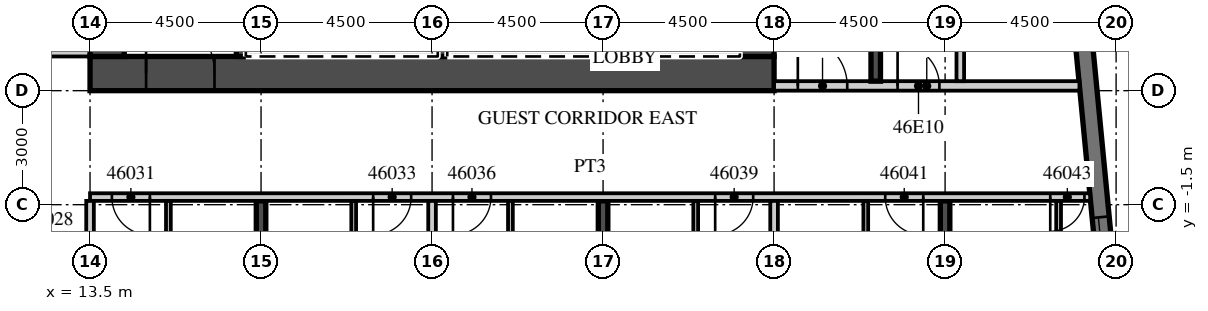
"""IFC4 building model, lengths in metres.
Left out: names, types, materials, properties, quantities, classifications, styles, units other than length and angle.
Written with IfcOpenShell. Run it as: python <this file> out.ifc"""

import sys

from ifc_helpers import new_model, si_unit, direction, frame, frame_2d, origin, place, context, subcontext, project, spatial, rectangle, extrude, element, fill, save


model = new_model("IFC4")
c1 = context("Model", 3, precision=1e-05, world=origin(), true_north=direction((0.0, 1.0)))
c2 = subcontext(c1, "Body", "Model", "MODEL_VIEW")
j1 = project(units=[si_unit("LENGTHUNIT", "METRE"), si_unit("PLANEANGLEUNIT", "RADIAN")], contexts=[c1])
p1 = place(None, origin())
s1 = spatial("IfcSite", under=j1, at=p1, CompositionType="ELEMENT")
p2 = place(p1, origin())
s2 = spatial("IfcBuilding", under=s1, at=p2, CompositionType="ELEMENT")
p3 = place(p2, frame((0.0, 0.0, 193.3)))
s3 = spatial("IfcBuildingStorey", under=s2, at=p3, CompositionType="ELEMENT", Elevation=193.3)
p4 = place(p3, frame((18.0, -19.245, 0.0), z_axis=(0.0, 0.0, 1.0), x_axis=(0.0, 1.0, 0.0)))
e1 = element("IfcWall", 1, at=p4, inside=s3, PredefinedType="SHEAR", context=c2, shape_type="SweptSolid", body=[
    extrude(rectangle(XDim=17.845, YDim=0.25, at=frame_2d((8.923, 0.0))), origin(), (0.0, 0.0, 1.0), 3.3),
])
p5 = place(p3, frame((27.0, -18.379, 0.0), z_axis=(0.0, 0.0, 1.0), x_axis=(0.0, 1.0, 0.0)))
e2 = element("IfcWall", 2, at=p5, inside=s3, PredefinedType="SHEAR", context=c2, shape_type="SweptSolid", body=[
    extrude(rectangle(XDim=16.979, YDim=0.25, at=frame_2d((8.489, 0.0))), origin(), (0.0, 0.0, 1.0), 3.3),
])
p6 = place(p3, frame((36.0, -17.512, 0.0), z_axis=(0.0, 0.0, 1.0), x_axis=(0.0, 1.0, 0.0)))
e3 = element("IfcWall", 3, at=p6, inside=s3, PredefinedType="SHEAR", context=c2, shape_type="SweptSolid", body=[
    extrude(rectangle(XDim=16.112, YDim=0.25, at=frame_2d((8.056, 0.0))), origin(), (0.0, 0.0, 1.0), 3.3),
])
p7 = place(p3, frame((41.214, -13.466, 0.0), z_axis=(0.0, 0.0, 1.0), x_axis=(-0.095847314626, 0.995396047952, 0.0)))
e4 = element("IfcWall", 4, at=p7, inside=s3, PredefinedType="SOLIDWALL", context=c2, shape_type="SweptSolid", body=[
    extrude(rectangle(XDim=34.0, YDim=0.45, at=frame_2d((17.0, 0.0))), origin(), (0.0, 0.0, 1.0), 3.02),
])
p8 = place(p7, frame((3.869, 0.0, 0.45)))
e5 = element("IfcOpeningElement", 5, at=p8, cuts=e4, PredefinedType="OPENING", context=c2, shape_type="SweptSolid", body=[
    extrude(rectangle(XDim=3.3, YDim=2.25, at=frame_2d((1.65, 1.125))), frame((0.0, 0.235, 0.0), z_axis=(0.0, -1.0, 0.0), x_axis=(1.0, 0.0, 0.0)), (0.0, 0.0, 1.0), 0.47),
])
p9 = place(p7, frame((8.39, 0.0, 0.45)))
e6 = element("IfcOpeningElement", 6, at=p9, cuts=e4, PredefinedType="OPENING", context=c2, shape_type="SweptSolid", body=[
    extrude(rectangle(XDim=3.3, YDim=2.25, at=frame_2d((1.65, 1.125))), frame((0.0, 0.235, 0.0), z_axis=(0.0, -1.0, 0.0), x_axis=(1.0, 0.0, 0.0)), (0.0, 0.0, 1.0), 0.47),
])
p10 = place(p3, frame((-13.5, 2.5, 0.0), z_axis=(0.0, 0.0, 1.0), x_axis=(1.0, 0.0, 0.0)))
e7 = element("IfcWall", 7, at=p10, inside=s3, PredefinedType="PARTITIONING", context=c2, shape_type="SweptSolid", body=[
    extrude(rectangle(XDim=27.0, YDim=0.2, at=frame_2d((13.5, 0.0))), origin(), (0.0, 0.0, 1.0), 3.02),
])
p11 = place(p10, frame((0.575, 0.0, 0.0)))
e8 = element("IfcOpeningElement", 8, at=p11, cuts=e7, PredefinedType="OPENING", context=c2, shape_type="SweptSolid", body=[
    extrude(rectangle(XDim=1.0, YDim=2.1, at=frame_2d((0.5, 1.05))), frame((0.0, 0.11, 0.0), z_axis=(0.0, -1.0, 0.0), x_axis=(1.0, 0.0, 0.0)), (0.0, 0.0, 1.0), 0.22),
])
p12 = place(p10, frame((9.863, 0.0, 0.0)))
e9 = element("IfcOpeningElement", 9, at=p12, cuts=e7, PredefinedType="OPENING", context=c2, shape_type="SweptSolid", body=[
    extrude(rectangle(XDim=1.2, YDim=2.1, at=frame_2d((0.6, 1.05))), frame((0.0, 0.11, 0.0), z_axis=(0.0, -1.0, 0.0), x_axis=(1.0, 0.0, 0.0)), (0.0, 0.0, 1.0), 0.22),
])
p13 = place(p10, frame((14.075, 0.0, 0.0)))
e10 = element("IfcOpeningElement", 10, at=p13, cuts=e7, PredefinedType="OPENING", context=c2, shape_type="SweptSolid", body=[
    extrude(rectangle(XDim=1.0, YDim=2.1, at=frame_2d((0.5, 1.05))), frame((0.0, 0.11, 0.0), z_axis=(0.0, -1.0, 0.0), x_axis=(1.0, 0.0, 0.0)), (0.0, 0.0, 1.0), 0.22),
])
p14 = place(p10, frame((18.55, 0.0, 0.0)))
e11 = element("IfcOpeningElement", 11, at=p14, cuts=e7, PredefinedType="OPENING", context=c2, shape_type="SweptSolid", body=[
    extrude(rectangle(XDim=1.0, YDim=2.1, at=frame_2d((0.5, 1.05))), frame((0.0, 0.11, 0.0), z_axis=(0.0, -1.0, 0.0), x_axis=(1.0, 0.0, 0.0)), (0.0, 0.0, 1.0), 0.22),
])
p15 = place(p10, frame((23.075, 0.0, 0.0)))
e12 = element("IfcOpeningElement", 12, at=p15, cuts=e7, PredefinedType="OPENING", context=c2, shape_type="SweptSolid", body=[
    extrude(rectangle(XDim=1.0, YDim=2.1, at=frame_2d((0.5, 1.05))), frame((0.0, 0.11, 0.0), z_axis=(0.0, -1.0, 0.0), x_axis=(1.0, 0.0, 0.0)), (0.0, 0.0, 1.0), 0.22),
])
p16 = place(p3, frame((13.5, -1.3, 0.0), z_axis=(0.0, 0.0, 1.0), x_axis=(1.0, 0.0, 0.0)))
e13 = element("IfcWall", 13, at=p16, inside=s3, PredefinedType="PARTITIONING", context=c2, shape_type="SweptSolid", body=[
    extrude(rectangle(XDim=26.317, YDim=0.2, at=frame_2d((13.158, 0.0))), origin(), (0.0, 0.0, 1.0), 3.02),
])
p17 = place(p16, frame((0.575, 0.0, 0.0)))
e14 = element("IfcOpeningElement", 14, at=p17, cuts=e13, PredefinedType="OPENING", context=c2, shape_type="SweptSolid", body=[
    extrude(rectangle(XDim=1.0, YDim=2.1, at=frame_2d((0.5, 1.05))), frame((0.0, 0.11, 0.0), z_axis=(0.0, -1.0, 0.0), x_axis=(1.0, 0.0, 0.0)), (0.0, 0.0, 1.0), 0.22),
])
p18 = place(p16, frame((7.45, 0.0, 0.0)))
e15 = element("IfcOpeningElement", 15, at=p18, cuts=e13, PredefinedType="OPENING", context=c2, shape_type="SweptSolid", body=[
    extrude(rectangle(XDim=1.0, YDim=2.1, at=frame_2d((0.5, 1.05))), frame((0.0, 0.11, 0.0), z_axis=(0.0, -1.0, 0.0), x_axis=(1.0, 0.0, 0.0)), (0.0, 0.0, 1.0), 0.22),
])
p19 = place(p16, frame((9.55, 0.0, 0.0)))
e16 = element("IfcOpeningElement", 16, at=p19, cuts=e13, PredefinedType="OPENING", context=c2, shape_type="SweptSolid", body=[
    extrude(rectangle(XDim=1.0, YDim=2.1, at=frame_2d((0.5, 1.05))), frame((0.0, 0.11, 0.0), z_axis=(0.0, -1.0, 0.0), x_axis=(1.0, 0.0, 0.0)), (0.0, 0.0, 1.0), 0.22),
])
p20 = place(p16, frame((16.45, 0.0, 0.0)))
e17 = element("IfcOpeningElement", 17, at=p20, cuts=e13, PredefinedType="OPENING", context=c2, shape_type="SweptSolid", body=[
    extrude(rectangle(XDim=1.0, YDim=2.1, at=frame_2d((0.5, 1.05))), frame((0.0, 0.11, 0.0), z_axis=(0.0, -1.0, 0.0), x_axis=(1.0, 0.0, 0.0)), (0.0, 0.0, 1.0), 0.22),
])
p21 = place(p16, frame((20.925, 0.0, 0.0)))
e18 = element("IfcOpeningElement", 18, at=p21, cuts=e13, PredefinedType="OPENING", context=c2, shape_type="SweptSolid", body=[
    extrude(rectangle(XDim=1.0, YDim=2.1, at=frame_2d((0.5, 1.05))), frame((0.0, 0.11, 0.0), z_axis=(0.0, -1.0, 0.0), x_axis=(1.0, 0.0, 0.0)), (0.0, 0.0, 1.0), 0.22),
])
p22 = place(p16, frame((25.267, 0.0, 0.0)))
e19 = element("IfcOpeningElement", 19, at=p22, cuts=e13, PredefinedType="OPENING", context=c2, shape_type="SweptSolid", body=[
    extrude(rectangle(XDim=0.9, YDim=2.1, at=frame_2d((0.45, 1.05))), frame((0.0, 0.11, 0.0), z_axis=(0.0, -1.0, 0.0), x_axis=(1.0, 0.0, 0.0)), (0.0, 0.0, 1.0), 0.22),
])
p23 = place(p3, frame((13.5, -19.701, 0.0), z_axis=(0.0, 0.0, 1.0), x_axis=(0.0, 1.0, 0.0)))
e20 = element("IfcWall", 20, at=p23, inside=s3, PredefinedType="PARTITIONING", context=c2, shape_type="SweptSolid", body=[
    extrude(rectangle(XDim=18.301, YDim=0.2, at=frame_2d((9.15, 0.0))), origin(), (0.0, 0.0, 1.0), 3.02),
])
p24 = place(p3, frame((15.562, -8.625, 0.0), z_axis=(0.0, 0.0, 1.0), x_axis=(0.0, 1.0, 0.0)))
e21 = element("IfcWall", 21, at=p24, inside=s3, PredefinedType="PARTITIONING", context=c2, shape_type="SweptSolid", body=[
    extrude(rectangle(XDim=7.225, YDim=0.125, at=frame_2d((3.613, 0.0))), origin(), (0.0, 0.0, 1.0), 3.02),
])
p25 = place(p24, frame((3.875, 0.0, 0.0)))
e22 = element("IfcOpeningElement", 22, at=p25, cuts=e21, PredefinedType="OPENING", context=c2, shape_type="SweptSolid", body=[
    extrude(rectangle(XDim=0.9, YDim=2.1, at=frame_2d((0.45, 1.05))), frame((0.0, 0.073, 0.0), z_axis=(0.0, -1.0, 0.0), x_axis=(1.0, 0.0, 0.0)), (0.0, 0.0, 1.0), 0.145),
])
p26 = place(p3, frame((22.5, -18.834, 0.0), z_axis=(0.0, 0.0, 1.0), x_axis=(0.0, 1.0, 0.0)))
e23 = element("IfcWall", 23, at=p26, inside=s3, PredefinedType="PARTITIONING", context=c2, shape_type="SweptSolid", body=[
    extrude(rectangle(XDim=17.434, YDim=0.2, at=frame_2d((8.717, 0.0))), origin(), (0.0, 0.0, 1.0), 3.02),
])
p27 = place(p3, frame((20.438, -8.625, 0.0), z_axis=(0.0, 0.0, 1.0), x_axis=(0.0, 1.0, 0.0)))
e24 = element("IfcWall", 24, at=p27, inside=s3, PredefinedType="PARTITIONING", context=c2, shape_type="SweptSolid", body=[
    extrude(rectangle(XDim=7.225, YDim=0.125, at=frame_2d((3.613, 0.0))), origin(), (0.0, 0.0, 1.0), 3.02),
])
p28 = place(p27, frame((3.875, 0.0, 0.0)))
e25 = element("IfcOpeningElement", 25, at=p28, cuts=e24, PredefinedType="OPENING", context=c2, shape_type="SweptSolid", body=[
    extrude(rectangle(XDim=0.9, YDim=2.1, at=frame_2d((0.45, 1.05))), frame((0.0, 0.073, 0.0), z_axis=(0.0, -1.0, 0.0), x_axis=(1.0, 0.0, 0.0)), (0.0, 0.0, 1.0), 0.145),
])
p29 = place(p3, frame((24.562, -8.625, 0.0), z_axis=(0.0, 0.0, 1.0), x_axis=(0.0, 1.0, 0.0)))
e26 = element("IfcWall", 26, at=p29, inside=s3, PredefinedType="PARTITIONING", context=c2, shape_type="SweptSolid", body=[
    extrude(rectangle(XDim=7.225, YDim=0.125, at=frame_2d((3.613, 0.0))), origin(), (0.0, 0.0, 1.0), 3.02),
])
p30 = place(p29, frame((3.875, 0.0, 0.0)))
e27 = element("IfcOpeningElement", 27, at=p30, cuts=e26, PredefinedType="OPENING", context=c2, shape_type="SweptSolid", body=[
    extrude(rectangle(XDim=0.9, YDim=2.1, at=frame_2d((0.45, 1.05))), frame((0.0, 0.073, 0.0), z_axis=(0.0, -1.0, 0.0), x_axis=(1.0, 0.0, 0.0)), (0.0, 0.0, 1.0), 0.145),
])
p31 = place(p3, frame((31.5, -17.967, 0.0), z_axis=(0.0, 0.0, 1.0), x_axis=(0.0, 1.0, 0.0)))
e28 = element("IfcWall", 28, at=p31, inside=s3, PredefinedType="PARTITIONING", context=c2, shape_type="SweptSolid", body=[
    extrude(rectangle(XDim=16.567, YDim=0.2, at=frame_2d((8.284, 0.0))), origin(), (0.0, 0.0, 1.0), 3.02),
])
p32 = place(p3, frame((29.438, -8.625, 0.0), z_axis=(0.0, 0.0, 1.0), x_axis=(0.0, 1.0, 0.0)))
e29 = element("IfcWall", 29, at=p32, inside=s3, PredefinedType="PARTITIONING", context=c2, shape_type="SweptSolid", body=[
    extrude(rectangle(XDim=7.225, YDim=0.125, at=frame_2d((3.613, 0.0))), origin(), (0.0, 0.0, 1.0), 3.02),
])
p33 = place(p32, frame((3.875, 0.0, 0.0)))
e30 = element("IfcOpeningElement", 30, at=p33, cuts=e29, PredefinedType="OPENING", context=c2, shape_type="SweptSolid", body=[
    extrude(rectangle(XDim=0.9, YDim=2.1, at=frame_2d((0.45, 1.05))), frame((0.0, 0.073, 0.0), z_axis=(0.0, -1.0, 0.0), x_axis=(1.0, 0.0, 0.0)), (0.0, 0.0, 1.0), 0.145),
])
p34 = place(p3, frame((33.913, -8.625, 0.0), z_axis=(0.0, 0.0, 1.0), x_axis=(0.0, 1.0, 0.0)))
e31 = element("IfcWall", 31, at=p34, inside=s3, PredefinedType="PARTITIONING", context=c2, shape_type="SweptSolid", body=[
    extrude(rectangle(XDim=7.225, YDim=0.125, at=frame_2d((3.613, 0.0))), origin(), (0.0, 0.0, 1.0), 3.02),
])
p35 = place(p34, frame((3.875, 0.0, 0.0)))
e32 = element("IfcOpeningElement", 32, at=p35, cuts=e31, PredefinedType="OPENING", context=c2, shape_type="SweptSolid", body=[
    extrude(rectangle(XDim=0.9, YDim=2.1, at=frame_2d((0.45, 1.05))), frame((0.0, 0.073, 0.0), z_axis=(0.0, -1.0, 0.0), x_axis=(1.0, 0.0, 0.0)), (0.0, 0.0, 1.0), 0.145),
])
p36 = place(p3, frame((38.987, -6.445, 0.0), z_axis=(0.0, 0.0, 1.0), x_axis=(0.0, 1.0, 0.0)))
e33 = element("IfcWall", 33, at=p36, inside=s3, PredefinedType="PARTITIONING", context=c2, shape_type="SweptSolid", body=[
    extrude(rectangle(XDim=5.045, YDim=0.125, at=frame_2d((2.522, 0.0))), origin(), (0.0, 0.0, 1.0), 3.02),
])
p37 = place(p36, frame((1.695, 0.0, 0.0)))
e34 = element("IfcOpeningElement", 34, at=p37, cuts=e33, PredefinedType="OPENING", context=c2, shape_type="SweptSolid", body=[
    extrude(rectangle(XDim=0.9, YDim=2.1, at=frame_2d((0.45, 1.05))), frame((0.0, 0.073, 0.0), z_axis=(0.0, -1.0, 0.0), x_axis=(1.0, 0.0, 0.0)), (0.0, 0.0, 1.0), 0.145),
])
p38 = place(p3, frame((13.5, 1.95, 0.0), z_axis=(0.0, 0.0, 1.0), x_axis=(1.0, 0.0, 0.0)))
e35 = element("IfcWall", 35, at=p38, inside=s3, PredefinedType="SHEAR", context=c2, shape_type="SweptSolid", body=[
    extrude(rectangle(XDim=18.0, YDim=0.9, at=frame_2d((9.0, 0.0))), origin(), (0.0, 0.0, 1.0), 3.02),
])
p39 = place(p38, frame((1.475, 0.0, 0.0)))
e36 = element("IfcOpeningElement", 36, at=p39, cuts=e35, PredefinedType="OPENING", context=c2, shape_type="SweptSolid", body=[
    extrude(rectangle(XDim=1.8, YDim=2.1, at=frame_2d((0.9, 1.05))), frame((0.0, 0.46, 0.0), z_axis=(0.0, -1.0, 0.0), x_axis=(1.0, 0.0, 0.0)), (0.0, 0.0, 1.0), 0.92),
])
p40 = place(p3, frame((31.05, 2.4, 0.0), z_axis=(0.0, 0.0, 1.0), x_axis=(0.0, 1.0, 0.0)))
e37 = element("IfcWall", 37, at=p40, inside=s3, PredefinedType="SHEAR", context=c2, shape_type="SweptSolid", body=[
    extrude(rectangle(XDim=12.8, YDim=0.9, at=frame_2d((6.4, 0.0))), origin(), (0.0, 0.0, 1.0), 3.02),
])
p41 = place(p40, frame((0.2, 0.0, 0.0)))
e38 = element("IfcOpeningElement", 38, at=p41, cuts=e37, PredefinedType="OPENING", context=c2, shape_type="SweptSolid", body=[
    extrude(rectangle(XDim=1.1, YDim=2.1, at=frame_2d((0.55, 1.05))), frame((0.0, 0.46, 0.0), z_axis=(0.0, -1.0, 0.0), x_axis=(1.0, 0.0, 0.0)), (0.0, 0.0, 1.0), 0.92),
])
p42 = place(p3, frame((13.95, 2.4, 0.0), z_axis=(0.0, 0.0, 1.0), x_axis=(0.0, 1.0, 0.0)))
e39 = element("IfcWall", 39, at=p42, inside=s3, PredefinedType="SHEAR", context=c2, shape_type="SweptSolid", body=[
    extrude(rectangle(XDim=12.2, YDim=0.9, at=frame_2d((6.1, 0.0))), origin(), (0.0, 0.0, 1.0), 3.02),
])
p43 = place(p3, frame((17.475, 2.4, 0.0), z_axis=(0.0, 0.0, 1.0), x_axis=(0.0, 1.0, 0.0)))
e40 = element("IfcWall", 40, at=p43, inside=s3, PredefinedType="SHEAR", context=c2, shape_type="SweptSolid", body=[
    extrude(rectangle(XDim=3.15, YDim=0.25, at=frame_2d((1.575, 0.0))), origin(), (0.0, 0.0, 1.0), 3.02),
])
for number, where, z_axis, x_axis in (
    (41, (27.975, 2.4, 0.0), (0.0, 0.0, 1.0), (0.0, 1.0, 0.0)),
    (42, (22.775, 2.4, 0.0), (0.0, 0.0, 1.0), (0.0, 1.0, 0.0)),
):
    element("IfcWall", number, at=place(p3, frame(where, z_axis=z_axis, x_axis=x_axis)), inside=s3, PredefinedType="SHEAR", context=c2, shape_type="SweptSolid", body=[
        extrude(rectangle(XDim=2.9, YDim=0.25, at=frame_2d((1.45, 0.0))), origin(), (0.0, 0.0, 1.0), 3.02),
    ])
p44 = place(p3, frame((31.5, 1.625, 0.0), z_axis=(0.0, 0.0, 1.0), x_axis=(1.0, 0.0, 0.0)))
e43 = element("IfcWall", 43, at=p44, inside=s3, PredefinedType="PARTITIONING", context=c2, shape_type="SweptSolid", body=[
    extrude(rectangle(XDim=8.035, YDim=0.25, at=frame_2d((4.018, 0.0))), origin(), (0.0, 0.0, 1.0), 3.02),
])
p45 = place(p44, frame((0.625, 0.0, 0.0)))
e44 = element("IfcOpeningElement", 44, at=p45, cuts=e43, PredefinedType="OPENING", context=c2, shape_type="SweptSolid", body=[
    extrude(rectangle(XDim=1.3, YDim=2.1, at=frame_2d((0.65, 1.05))), frame((0.0, 0.135, 0.0), z_axis=(0.0, -1.0, 0.0), x_axis=(1.0, 0.0, 0.0)), (0.0, 0.0, 1.0), 0.27),
])
p46 = place(p44, frame((3.25, 0.0, 0.0)))
e45 = element("IfcOpeningElement", 45, at=p46, cuts=e43, PredefinedType="OPENING", context=c2, shape_type="SweptSolid", body=[
    extrude(rectangle(XDim=1.1, YDim=2.1, at=frame_2d((0.55, 1.05))), frame((0.0, 0.135, 0.0), z_axis=(0.0, -1.0, 0.0), x_axis=(1.0, 0.0, 0.0)), (0.0, 0.0, 1.0), 0.27),
])
p47 = place(p3, frame((34.175, 1.75, 0.0), z_axis=(0.0, 0.0, 1.0), x_axis=(0.0, 1.0, 0.0)))
e46 = element("IfcWall", 46, at=p47, inside=s3, PredefinedType="SHEAR", context=c2, shape_type="SweptSolid", body=[
    extrude(rectangle(XDim=8.35, YDim=0.25, at=frame_2d((4.175, 0.0))), origin(), (0.0, 0.0, 1.0), 3.02),
])
p48 = place(p3, frame((36.4, 1.75, 0.0), z_axis=(0.0, 0.0, 1.0), x_axis=(0.0, 1.0, 0.0)))
e47 = element("IfcWall", 47, at=p48, inside=s3, PredefinedType="PARTITIONING", context=c2, shape_type="SweptSolid", body=[
    extrude(rectangle(XDim=15.95, YDim=0.2, at=frame_2d((7.975, 0.0))), origin(), (0.0, 0.0, 1.0), 3.02),
])
p49 = place(p48, frame((14.7, 0.0, 0.0)))
e48 = element("IfcOpeningElement", 48, at=p49, cuts=e47, PredefinedType="OPENING", context=c2, shape_type="SweptSolid", body=[
    extrude(rectangle(XDim=0.9, YDim=2.1, at=frame_2d((0.45, 1.05))), frame((0.0, 0.11, 0.0), z_axis=(0.0, -1.0, 0.0), x_axis=(1.0, 0.0, 0.0)), (0.0, 0.0, 1.0), 0.22),
])
p50 = place(p9, origin())
e49 = element("IfcWindow", 49, at=p50, inside=s3, PartitioningType="SINGLE_PANEL", PredefinedType="WINDOW", context=c2, shape_type="SweptSolid", body=[
    extrude(rectangle(XDim=3.3, YDim=2.25, at=frame_2d((1.65, 1.125))), frame((0.0, 0.09, 0.0), z_axis=(0.0, -1.0, 0.0), x_axis=(1.0, 0.0, 0.0)), (0.0, 0.0, 1.0), 0.06),
])
fill(e6, e49)
p51 = place(p17, origin())
e50 = element("IfcDoor", 50, at=p51, inside=s3, OperationType="SINGLE_SWING_RIGHT", PredefinedType="DOOR", context=c2, shape_type="SweptSolid", body=[
    extrude(rectangle(XDim=1.0, YDim=2.1, at=frame_2d((0.5, 1.05))), frame((0.0, 0.025, 0.0), z_axis=(0.0, -1.0, 0.0), x_axis=(1.0, 0.0, 0.0)), (0.0, 0.0, 1.0), 0.05),
])
fill(e14, e50)
p52 = place(p18, origin())
e51 = element("IfcDoor", 51, at=p52, inside=s3, OperationType="SINGLE_SWING_LEFT", PredefinedType="DOOR", context=c2, shape_type="SweptSolid", body=[
    extrude(rectangle(XDim=1.0, YDim=2.1, at=frame_2d((0.5, 1.05))), frame((0.0, 0.025, 0.0), z_axis=(0.0, -1.0, 0.0), x_axis=(1.0, 0.0, 0.0)), (0.0, 0.0, 1.0), 0.05),
])
fill(e15, e51)
p53 = place(p19, origin())
e52 = element("IfcDoor", 52, at=p53, inside=s3, OperationType="SINGLE_SWING_LEFT", PredefinedType="DOOR", context=c2, shape_type="SweptSolid", body=[
    extrude(rectangle(XDim=1.0, YDim=2.1, at=frame_2d((0.5, 1.05))), frame((0.0, 0.025, 0.0), z_axis=(0.0, -1.0, 0.0), x_axis=(1.0, 0.0, 0.0)), (0.0, 0.0, 1.0), 0.05),
])
fill(e16, e52)
p54 = place(p20, origin())
e53 = element("IfcDoor", 53, at=p54, inside=s3, OperationType="SINGLE_SWING_LEFT", PredefinedType="DOOR", context=c2, shape_type="SweptSolid", body=[
    extrude(rectangle(XDim=1.0, YDim=2.1, at=frame_2d((0.5, 1.05))), frame((0.0, 0.025, 0.0), z_axis=(0.0, -1.0, 0.0), x_axis=(1.0, 0.0, 0.0)), (0.0, 0.0, 1.0), 0.05),
])
fill(e17, e53)
p55 = place(p21, origin())
e54 = element("IfcDoor", 54, at=p55, inside=s3, OperationType="SINGLE_SWING_RIGHT", PredefinedType="DOOR", context=c2, shape_type="SweptSolid", body=[
    extrude(rectangle(XDim=1.0, YDim=2.1, at=frame_2d((0.5, 1.05))), frame((0.0, 0.025, 0.0), z_axis=(0.0, -1.0, 0.0), x_axis=(1.0, 0.0, 0.0)), (0.0, 0.0, 1.0), 0.05),
])
fill(e18, e54)
p56 = place(p22, origin())
e55 = element("IfcDoor", 55, at=p56, inside=s3, OperationType="SINGLE_SWING_LEFT", PredefinedType="DOOR", context=c2, shape_type="SweptSolid", body=[
    extrude(rectangle(XDim=0.9, YDim=2.1, at=frame_2d((0.45, 1.05))), frame((0.0, 0.025, 0.0), z_axis=(0.0, -1.0, 0.0), x_axis=(1.0, 0.0, 0.0)), (0.0, 0.0, 1.0), 0.05),
])
fill(e19, e55)
p57 = place(p39, origin())
e56 = element("IfcDoor", 56, at=p57, inside=s3, OperationType="DOUBLE_DOOR_DOUBLE_SWING", PredefinedType="DOOR", context=c2, shape_type="SweptSolid", body=[
    extrude(rectangle(XDim=1.8, YDim=2.1, at=frame_2d((0.9, 1.05))), frame((0.0, 0.025, 0.0), z_axis=(0.0, -1.0, 0.0), x_axis=(1.0, 0.0, 0.0)), (0.0, 0.0, 1.0), 0.05),
])
fill(e36, e56)
p58 = place(p45, origin())
e57 = element("IfcDoor", 57, at=p58, inside=s3, OperationType="SINGLE_SWING_LEFT", PredefinedType="DOOR", context=c2, shape_type="SweptSolid", body=[
    extrude(rectangle(XDim=1.3, YDim=2.1, at=frame_2d((0.65, 1.05))), frame((0.0, 0.025, 0.0), z_axis=(0.0, -1.0, 0.0), x_axis=(1.0, 0.0, 0.0)), (0.0, 0.0, 1.0), 0.05),
])
fill(e44, e57)
p59 = place(p46, origin())
e58 = element("IfcDoor", 58, at=p59, inside=s3, OperationType="SINGLE_SWING_LEFT", PredefinedType="DOOR", context=c2, shape_type="SweptSolid", body=[
    extrude(rectangle(XDim=1.1, YDim=2.1, at=frame_2d((0.55, 1.05))), frame((0.0, 0.025, 0.0), z_axis=(0.0, -1.0, 0.0), x_axis=(1.0, 0.0, 0.0)), (0.0, 0.0, 1.0), 0.05),
])
fill(e45, e58)
save(model, sys.argv[1])
